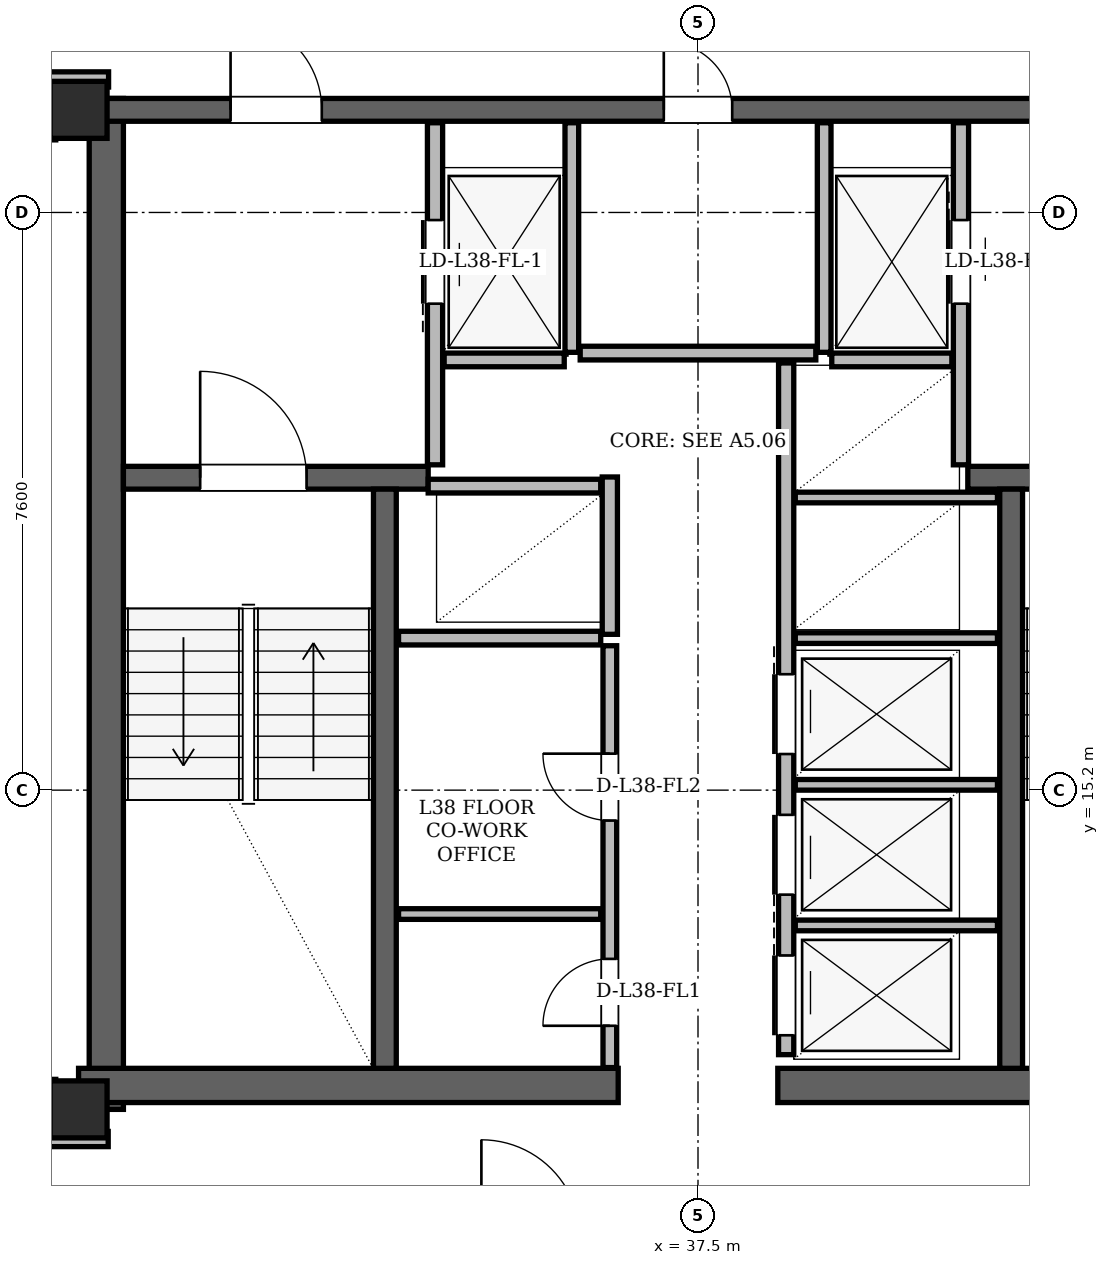
"""IFC4 building model, lengths in metres.
Left out: names, types, materials, properties, quantities, classifications, styles, units other than length and angle.
Written with IfcOpenShell. Run it as: python <this file> out.ifc"""

import sys

from ifc_helpers import new_model, si_unit, direction, frame, frame_2d, origin, origin_2d, place, context, subcontext, project, spatial, rectangle, hollow_rectangle, extrude, element, fill, save


model = new_model("IFC4")
c1 = context("Model", 3, precision=1e-05, world=origin(), true_north=direction((0.0, 1.0)))
c2 = subcontext(c1, "Body", "Model", "MODEL_VIEW")
j1 = project(units=[si_unit("LENGTHUNIT", "METRE"), si_unit("PLANEANGLEUNIT", "RADIAN")], contexts=[c1])
p1 = place(None, origin())
s1 = spatial("IfcSite", under=j1, at=p1, CompositionType="ELEMENT")
p2 = place(p1, origin())
s2 = spatial("IfcBuilding", under=s1, at=p2, CompositionType="ELEMENT")
p3 = place(p2, frame((0.0, 0.0, 145.8)))
s3 = spatial("IfcBuildingStorey", under=s2, at=p3, CompositionType="ELEMENT", Elevation=145.8)
for number, where, z_axis, x_axis in (
    (1, (29.35, 11.0, 0.0), (0.0, 0.0, 1.0), (1.0, 0.0, 0.0)),
    (2, (29.35, 24.15, 0.0), (0.0, 0.0, 1.0), (1.0, 0.0, 0.0)),
):
    element("IfcColumn", number, at=place(p3, frame(where, z_axis=z_axis, x_axis=x_axis)), inside=s3, PredefinedType="COLUMN", context=c2, shape_type="SweptSolid", body=[
        extrude(hollow_rectangle(XDim=0.75, YDim=0.75, WallThickness=0.06, at=origin_2d()), origin(), (0.0, 0.0, 1.0), 3.6),
    ])
p4 = place(p3, frame((29.715, 11.0, 0.0), z_axis=(0.0, 0.0, 1.0), x_axis=(0.0, 1.0, 0.0)))
e3 = element("IfcWall", 3, at=p4, inside=s3, PredefinedType="SHEAR", context=c2, shape_type="SweptSolid", body=[
    extrude(rectangle(XDim=13.3, YDim=0.45, at=frame_2d((6.65, 0.0))), origin(), (0.0, 0.0, 1.0), 3.38),
])
for number, where, z_axis, x_axis in (
    (4, (29.35, 11.315, 0.0), (0.0, 0.0, 1.0), (1.0, 0.0, 0.0)),
    (5, (38.55, 11.315, 0.0), (0.0, 0.0, 1.0), (1.0, 0.0, 0.0)),
):
    element("IfcWall", number, at=place(p3, frame(where, z_axis=z_axis, x_axis=x_axis)), inside=s3, PredefinedType="SHEAR", context=c2, shape_type="SweptSolid", body=[
        extrude(rectangle(XDim=7.1, YDim=0.45, at=frame_2d((3.55, 0.0))), origin(), (0.0, 0.0, 1.0), 3.38),
    ])
p5 = place(p3, frame((29.65, 24.15, 0.0), z_axis=(0.0, 0.0, 1.0), x_axis=(1.0, 0.0, 0.0)))
e6 = element("IfcWall", 6, at=p5, inside=s3, PredefinedType="SHEAR", context=c2, shape_type="SweptSolid", body=[
    extrude(rectangle(XDim=15.7, YDim=0.3, at=frame_2d((7.85, 0.0))), origin(), (0.0, 0.0, 1.0), 3.38),
])
p6 = place(p5, frame((1.7, 0.0, 0.0)))
e7 = element("IfcOpeningElement", 7, at=p6, cuts=e6, PredefinedType="OPENING", context=c2, shape_type="SweptSolid", body=[
    extrude(rectangle(XDim=1.2, YDim=2.2, at=frame_2d((0.6, 1.1))), frame((0.0, 0.15, 0.0), z_axis=(0.0, -1.0, 0.0), x_axis=(1.0, 0.0, 0.0)), (0.0, 0.0, 1.0), 0.3),
])
p7 = place(p5, frame((12.8, 0.0, 0.0)))
e8 = element("IfcOpeningElement", 8, at=p7, cuts=e6, PredefinedType="OPENING", context=c2, shape_type="SweptSolid", body=[
    extrude(rectangle(XDim=1.2, YDim=2.2, at=frame_2d((0.6, 1.1))), frame((0.0, 0.15, 0.0), z_axis=(0.0, -1.0, 0.0), x_axis=(1.0, 0.0, 0.0)), (0.0, 0.0, 1.0), 0.3),
])
p8 = place(p5, frame((7.4, 0.0, 0.0)))
e9 = element("IfcOpeningElement", 9, at=p8, cuts=e6, PredefinedType="OPENING", context=c2, shape_type="SweptSolid", body=[
    extrude(rectangle(XDim=0.9, YDim=2.05, at=frame_2d((0.45, 1.025))), frame((0.0, 0.15, 0.0), z_axis=(0.0, -1.0, 0.0), x_axis=(1.0, 0.0, 0.0)), (0.0, 0.0, 1.0), 0.3),
])
p9 = place(p3, frame((29.94, 19.31, 0.0), z_axis=(0.0, 0.0, 1.0), x_axis=(1.0, 0.0, 0.0)))
e10 = element("IfcWall", 10, at=p9, inside=s3, PredefinedType="SHEAR", context=c2, shape_type="SweptSolid", body=[
    extrude(rectangle(XDim=4.01, YDim=0.3, at=frame_2d((2.005, 0.0))), origin(), (0.0, 0.0, 1.0), 3.38),
])
p10 = place(p9, frame((1.01, 0.0, 0.0)))
e11 = element("IfcOpeningElement", 11, at=p10, cuts=e10, PredefinedType="OPENING", context=c2, shape_type="SweptSolid", body=[
    extrude(rectangle(XDim=1.4, YDim=2.2, at=frame_2d((0.7, 1.1))), frame((0.0, 0.15, 0.0), z_axis=(0.0, -1.0, 0.0), x_axis=(1.0, 0.0, 0.0)), (0.0, 0.0, 1.0), 0.3),
])
p11 = place(p3, frame((41.05, 19.31, 0.0), z_axis=(0.0, 0.0, 1.0), x_axis=(1.0, 0.0, 0.0)))
e12 = element("IfcWall", 12, at=p11, inside=s3, PredefinedType="SHEAR", context=c2, shape_type="SweptSolid", body=[
    extrude(rectangle(XDim=4.01, YDim=0.3, at=frame_2d((2.005, 0.0))), origin(), (0.0, 0.0, 1.0), 3.38),
])
p12 = place(p11, frame((1.6, 0.0, 0.0)))
e13 = element("IfcOpeningElement", 13, at=p12, cuts=e12, PredefinedType="OPENING", context=c2, shape_type="SweptSolid", body=[
    extrude(rectangle(XDim=1.4, YDim=2.2, at=frame_2d((0.7, 1.1))), frame((0.0, 0.15, 0.0), z_axis=(0.0, -1.0, 0.0), x_axis=(1.0, 0.0, 0.0)), (0.0, 0.0, 1.0), 0.3),
])
for number, where, z_axis, x_axis in (
    (14, (33.38, 11.54, 0.0), (0.0, 0.0, 1.0), (0.0, 1.0, 0.0)),
    (15, (41.62, 11.54, 0.0), (0.0, 0.0, 1.0), (0.0, 1.0, 0.0)),
):
    element("IfcWall", number, at=place(p3, frame(where, z_axis=z_axis, x_axis=x_axis)), inside=s3, PredefinedType="SHEAR", context=c2, shape_type="SweptSolid", body=[
        extrude(rectangle(XDim=7.62, YDim=0.3, at=frame_2d((3.81, 0.0))), origin(), (0.0, 0.0, 1.0), 3.38),
    ])
p13 = place(p3, frame((32.649, 43.341, 0.0), z_axis=(0.0, 0.0, 1.0), x_axis=(-0.500002412417, -0.86602401097, 0.0)))
e16 = element("IfcWall", 16, at=p13, inside=s3, PredefinedType="SOLIDWALL", context=c2, shape_type="SweptSolid", body=[
    extrude(rectangle(XDim=35.404, YDim=0.34, at=frame_2d((17.702, 0.0))), origin(), (0.0, 0.0, 1.0), 2.6),
])
p14 = place(p13, frame((6.579, 0.0, 0.0)))
e17 = element("IfcOpeningElement", 17, at=p14, cuts=e16, PredefinedType="OPENING", context=c2, shape_type="SweptSolid", body=[
    extrude(rectangle(XDim=1.5, YDim=2.2, at=frame_2d((0.75, 1.1))), frame((0.0, 0.17, 0.0), z_axis=(0.0, -1.0, 0.0), x_axis=(1.0, 0.0, 0.0)), (0.0, 0.0, 1.0), 0.34),
])
p15 = place(p13, frame((26.289, 0.0, 0.0)))
e18 = element("IfcOpeningElement", 18, at=p15, cuts=e16, PredefinedType="OPENING", context=c2, shape_type="SweptSolid", body=[
    extrude(rectangle(XDim=1.5, YDim=2.2, at=frame_2d((0.75, 1.1))), frame((0.0, 0.17, 0.0), z_axis=(0.0, -1.0, 0.0), x_axis=(1.0, 0.0, 0.0)), (0.0, 0.0, 1.0), 0.34),
])
p16 = place(p13, frame((22.194, 0.0, 0.85)))
e19 = element("IfcOpeningElement", 19, at=p16, cuts=e16, PredefinedType="OPENING", context=c2, shape_type="SweptSolid", body=[
    extrude(rectangle(XDim=1.2, YDim=1.48, at=frame_2d((0.6, 0.74))), frame((0.0, 0.17, 0.0), z_axis=(0.0, -1.0, 0.0), x_axis=(1.0, 0.0, 0.0)), (0.0, 0.0, 1.0), 0.34),
])
p17 = place(p13, frame((2.317, 0.0, 0.85)))
e20 = element("IfcOpeningElement", 20, at=p17, cuts=e16, PredefinedType="OPENING", context=c2, shape_type="SweptSolid", body=[
    extrude(rectangle(XDim=1.6, YDim=1.64, at=frame_2d((0.8, 0.82))), frame((0.0, 0.17, 0.0), z_axis=(0.0, -1.0, 0.0), x_axis=(1.0, 0.0, 0.0)), (0.0, 0.0, 1.0), 0.34),
])
p18 = place(p13, frame((12.951, 0.0, 0.85)))
e21 = element("IfcOpeningElement", 21, at=p18, cuts=e16, PredefinedType="OPENING", context=c2, shape_type="SweptSolid", body=[
    extrude(rectangle(XDim=3.0, YDim=1.64, at=frame_2d((1.5, 0.82))), frame((0.0, 0.17, 0.0), z_axis=(0.0, -1.0, 0.0), x_axis=(1.0, 0.0, 0.0)), (0.0, 0.0, 1.0), 0.34),
])
p19 = place(p13, frame((20.282, 0.0, 0.85)))
e22 = element("IfcOpeningElement", 22, at=p19, cuts=e16, PredefinedType="OPENING", context=c2, shape_type="SweptSolid", body=[
    extrude(rectangle(XDim=1.2, YDim=1.48, at=frame_2d((0.6, 0.74))), frame((0.0, 0.17, 0.0), z_axis=(0.0, -1.0, 0.0), x_axis=(1.0, 0.0, 0.0)), (0.0, 0.0, 1.0), 0.34),
])
p20 = place(p13, frame((33.524, 0.0, 0.85)))
e23 = element("IfcOpeningElement", 23, at=p20, cuts=e16, PredefinedType="OPENING", context=c2, shape_type="SweptSolid", body=[
    extrude(rectangle(XDim=1.2, YDim=1.48, at=frame_2d((0.6, 0.74))), frame((0.0, 0.17, 0.0), z_axis=(0.0, -1.0, 0.0), x_axis=(1.0, 0.0, 0.0)), (0.0, 0.0, 1.0), 0.34),
])
p21 = place(p3, frame((34.04, 19.48, 0.0), z_axis=(0.0, 0.0, 1.0), x_axis=(0.0, 1.0, 0.0)))
e24 = element("IfcWall", 24, at=p21, inside=s3, PredefinedType="PARTITIONING", context=c2, shape_type="SweptSolid", body=[
    extrude(rectangle(XDim=4.5, YDim=0.2, at=frame_2d((2.25, 0.0))), origin(), (0.0, 0.0, 1.0), 2.42),
])
p22 = place(p21, frame((2.12, 0.0, 0.0)))
e25 = element("IfcOpeningElement", 25, at=p22, cuts=e24, PredefinedType="OPENING", context=c2, shape_type="SweptSolid", body=[
    extrude(rectangle(XDim=1.1, YDim=2.2, at=frame_2d((0.55, 1.1))), frame((0.0, 0.1, 0.0), z_axis=(0.0, -1.0, 0.0), x_axis=(1.0, 0.0, 0.0)), (0.0, 0.0, 1.0), 0.2),
])
p23 = place(p3, frame((35.84, 20.96, 0.0), z_axis=(0.0, 0.0, 1.0), x_axis=(0.0, 1.0, 0.0)))
e26 = element("IfcWall", 26, at=p23, inside=s3, PredefinedType="PARTITIONING", context=c2, shape_type="SweptSolid", body=[
    extrude(rectangle(XDim=3.02, YDim=0.18, at=frame_2d((1.51, 0.0))), origin(), (0.0, 0.0, 1.0), 2.42),
])
p24 = place(p3, frame((34.16, 20.86, 0.0), z_axis=(0.0, 0.0, 1.0), x_axis=(1.0, 0.0, 0.0)))
e27 = element("IfcWall", 27, at=p24, inside=s3, PredefinedType="PARTITIONING", context=c2, shape_type="SweptSolid", body=[
    extrude(rectangle(XDim=1.58, YDim=0.18, at=frame_2d((0.79, 0.0))), origin(), (0.0, 0.0, 1.0), 3.38),
])
p25 = place(p3, frame((40.96, 19.48, 0.0), z_axis=(0.0, 0.0, 1.0), x_axis=(0.0, 1.0, 0.0)))
e28 = element("IfcWall", 28, at=p25, inside=s3, PredefinedType="PARTITIONING", context=c2, shape_type="SweptSolid", body=[
    extrude(rectangle(XDim=4.5, YDim=0.2, at=frame_2d((2.25, 0.0))), origin(), (0.0, 0.0, 1.0), 2.42),
])
p26 = place(p25, frame((2.12, 0.0, 0.0)))
e29 = element("IfcOpeningElement", 29, at=p26, cuts=e28, PredefinedType="OPENING", context=c2, shape_type="SweptSolid", body=[
    extrude(rectangle(XDim=1.1, YDim=2.2, at=frame_2d((0.55, 1.1))), frame((0.0, 0.1, 0.0), z_axis=(0.0, -1.0, 0.0), x_axis=(1.0, 0.0, 0.0)), (0.0, 0.0, 1.0), 0.2),
])
p27 = place(p3, frame((39.16, 20.96, 0.0), z_axis=(0.0, 0.0, 1.0), x_axis=(0.0, 1.0, 0.0)))
e30 = element("IfcWall", 30, at=p27, inside=s3, PredefinedType="PARTITIONING", context=c2, shape_type="SweptSolid", body=[
    extrude(rectangle(XDim=3.02, YDim=0.18, at=frame_2d((1.51, 0.0))), origin(), (0.0, 0.0, 1.0), 2.42),
])
p28 = place(p3, frame((39.26, 20.86, 0.0), z_axis=(0.0, 0.0, 1.0), x_axis=(1.0, 0.0, 0.0)))
e31 = element("IfcWall", 31, at=p28, inside=s3, PredefinedType="PARTITIONING", context=c2, shape_type="SweptSolid", body=[
    extrude(rectangle(XDim=1.58, YDim=0.18, at=frame_2d((0.79, 0.0))), origin(), (0.0, 0.0, 1.0), 3.38),
])
p29 = place(p3, frame((36.34, 17.25, 0.0), z_axis=(0.0, 0.0, 1.0), x_axis=(0.0, 1.0, 0.0)))
e32 = element("IfcWall", 32, at=p29, inside=s3, PredefinedType="PARTITIONING", context=c2, shape_type="SweptSolid", body=[
    extrude(rectangle(XDim=2.07, YDim=0.2, at=frame_2d((1.035, 0.0))), origin(), (0.0, 0.0, 1.0), 3.38),
])
p30 = place(p3, frame((33.95, 19.2, 0.0), z_axis=(0.0, 0.0, 1.0), x_axis=(1.0, 0.0, 0.0)))
e33 = element("IfcWall", 33, at=p30, inside=s3, PredefinedType="PARTITIONING", context=c2, shape_type="SweptSolid", body=[
    extrude(rectangle(XDim=2.27, YDim=0.18, at=frame_2d((1.135, 0.0))), origin(), (0.0, 0.0, 1.0), 3.38),
])
p31 = place(p3, frame((33.56, 17.2, 0.0), z_axis=(0.0, 0.0, 1.0), x_axis=(1.0, 0.0, 0.0)))
e34 = element("IfcWall", 34, at=p31, inside=s3, PredefinedType="PARTITIONING", context=c2, shape_type="SweptSolid", body=[
    extrude(rectangle(XDim=2.66, YDim=0.18, at=frame_2d((1.33, 0.0))), origin(), (0.0, 0.0, 1.0), 3.38),
])
p32 = place(p3, frame((36.34, 11.55, 0.0), z_axis=(0.0, 0.0, 1.0), x_axis=(0.0, 1.0, 0.0)))
e35 = element("IfcWall", 35, at=p32, inside=s3, PredefinedType="PARTITIONING", context=c2, shape_type="SweptSolid", body=[
    extrude(rectangle(XDim=5.55, YDim=0.18, at=frame_2d((2.775, 0.0))), origin(), (0.0, 0.0, 1.0), 3.38),
])
p33 = place(p32, frame((0.55, 0.0, 0.0)))
e36 = element("IfcOpeningElement", 36, at=p33, cuts=e35, PredefinedType="OPENING", context=c2, shape_type="SweptSolid", body=[
    extrude(rectangle(XDim=0.88, YDim=2.08, at=frame_2d((0.44, 1.04))), frame((0.0, 0.09, 0.0), z_axis=(0.0, -1.0, 0.0), x_axis=(1.0, 0.0, 0.0)), (0.0, 0.0, 1.0), 0.18),
])
p34 = place(p32, frame((3.25, 0.0, 0.0)))
e37 = element("IfcOpeningElement", 37, at=p34, cuts=e35, PredefinedType="OPENING", context=c2, shape_type="SweptSolid", body=[
    extrude(rectangle(XDim=0.88, YDim=2.08, at=frame_2d((0.44, 1.04))), frame((0.0, 0.09, 0.0), z_axis=(0.0, -1.0, 0.0), x_axis=(1.0, 0.0, 0.0)), (0.0, 0.0, 1.0), 0.18),
])
p35 = place(p3, frame((33.56, 13.57, 0.0), z_axis=(0.0, 0.0, 1.0), x_axis=(1.0, 0.0, 0.0)))
e38 = element("IfcWall", 38, at=p35, inside=s3, PredefinedType="PARTITIONING", context=c2, shape_type="SweptSolid", body=[
    extrude(rectangle(XDim=2.66, YDim=0.14, at=frame_2d((1.33, 0.0))), origin(), (0.0, 0.0, 1.0), 3.38),
])
p36 = place(p3, frame((38.66, 11.72, 0.0), z_axis=(0.0, 0.0, 1.0), x_axis=(0.0, 1.0, 0.0)))
e39 = element("IfcWall", 39, at=p36, inside=s3, PredefinedType="PARTITIONING", context=c2, shape_type="SweptSolid", body=[
    extrude(rectangle(XDim=9.1, YDim=0.2, at=frame_2d((4.55, 0.0))), origin(), (0.0, 0.0, 1.0), 3.38),
])
p37 = place(p36, frame((0.255, 0.0, 0.0)))
e40 = element("IfcOpeningElement", 40, at=p37, cuts=e39, PredefinedType="OPENING", context=c2, shape_type="SweptSolid", body=[
    extrude(rectangle(XDim=1.05, YDim=2.15, at=frame_2d((0.525, 1.075))), frame((0.0, 0.1, 0.0), z_axis=(0.0, -1.0, 0.0), x_axis=(1.0, 0.0, 0.0)), (0.0, 0.0, 1.0), 0.2),
])
p38 = place(p36, frame((2.105, 0.0, 0.0)))
e41 = element("IfcOpeningElement", 41, at=p38, cuts=e39, PredefinedType="OPENING", context=c2, shape_type="SweptSolid", body=[
    extrude(rectangle(XDim=1.05, YDim=2.15, at=frame_2d((0.525, 1.075))), frame((0.0, 0.1, 0.0), z_axis=(0.0, -1.0, 0.0), x_axis=(1.0, 0.0, 0.0)), (0.0, 0.0, 1.0), 0.2),
])
p39 = place(p36, frame((3.955, 0.0, 0.0)))
e42 = element("IfcOpeningElement", 42, at=p39, cuts=e39, PredefinedType="OPENING", context=c2, shape_type="SweptSolid", body=[
    extrude(rectangle(XDim=1.05, YDim=2.15, at=frame_2d((0.525, 1.075))), frame((0.0, 0.1, 0.0), z_axis=(0.0, -1.0, 0.0), x_axis=(1.0, 0.0, 0.0)), (0.0, 0.0, 1.0), 0.2),
])
for number, where, z_axis, x_axis in (
    (43, (38.78, 13.42, 0.0), (0.0, 0.0, 1.0), (1.0, 0.0, 0.0)),
    (44, (38.78, 15.27, 0.0), (0.0, 0.0, 1.0), (1.0, 0.0, 0.0)),
    (45, (38.78, 17.2, 0.0), (0.0, 0.0, 1.0), (1.0, 0.0, 0.0)),
    (46, (38.78, 19.05, 0.0), (0.0, 0.0, 1.0), (1.0, 0.0, 0.0)),
):
    element("IfcWall", number, at=place(p3, frame(where, z_axis=z_axis, x_axis=x_axis)), inside=s3, PredefinedType="PARTITIONING", context=c2, shape_type="SweptSolid", body=[
        extrude(rectangle(XDim=2.66, YDim=0.14, at=frame_2d((1.33, 0.0))), origin(), (0.0, 0.0, 1.0), 3.38),
    ])
p40 = place(p3, frame((35.95, 20.95, 0.0), z_axis=(0.0, 0.0, 1.0), x_axis=(1.0, 0.0, 0.0)))
e47 = element("IfcWall", 47, at=p40, inside=s3, PredefinedType="PARTITIONING", context=c2, shape_type="SweptSolid", body=[
    extrude(rectangle(XDim=3.1, YDim=0.18, at=frame_2d((1.55, 0.0))), origin(), (0.0, 0.0, 1.0), 3.38),
])
p41 = place(p3, frame((28.96, 10.61, 0.0), z_axis=(0.0, 0.0, 1.0), x_axis=(1.0, 0.0, 0.0)))
e48 = element("IfcWall", 48, at=p41, inside=s3, PredefinedType="PARTITIONING", context=c2, shape_type="SweptSolid", body=[
    extrude(rectangle(XDim=0.78, YDim=0.2, at=frame_2d((0.39, 0.0))), origin(), (0.0, 0.0, 1.0), 2.42),
])
p42 = place(p3, frame((28.955, 24.55, 0.0), z_axis=(0.0, 0.0, 1.0), x_axis=(1.0, 0.0, 0.0)))
e49 = element("IfcWall", 49, at=p42, inside=s3, PredefinedType="PARTITIONING", context=c2, shape_type="SweptSolid", body=[
    extrude(rectangle(XDim=0.79, YDim=0.2, at=frame_2d((0.395, 0.0))), origin(), (0.0, 0.0, 1.0), 2.842),
])
p43 = place(p3, frame((28.95, 10.95, 0.0), z_axis=(0.0, 0.0, 1.0), x_axis=(0.0, 1.0, 0.0)))
e50 = element("IfcWall", 50, at=p43, inside=s3, PredefinedType="PARTITIONING", context=c2, shape_type="SweptSolid", body=[
    extrude(rectangle(XDim=0.445, YDim=0.2, at=frame_2d((0.223, 0.0))), origin(), (0.0, 0.0, 1.0), 2.842),
])
p44 = place(p3, frame((28.95, 23.755, 0.0), z_axis=(0.0, 0.0, 1.0), x_axis=(0.0, 1.0, 0.0)))
e51 = element("IfcWall", 51, at=p44, inside=s3, PredefinedType="PARTITIONING", context=c2, shape_type="SweptSolid", body=[
    extrude(rectangle(XDim=0.565, YDim=0.2, at=frame_2d((0.283, 0.0))), origin(), (0.0, 0.0, 1.0), 3.38),
])
p45 = place(p33, origin())
e52 = element("IfcDoor", 52, at=p45, inside=s3, OperationType="SINGLE_SWING_LEFT", PredefinedType="DOOR", context=c2, shape_type="SweptSolid", body=[
    extrude(rectangle(XDim=0.88, YDim=2.08, at=frame_2d((0.44, 1.04))), frame((0.0, 0.025, 0.0), z_axis=(0.0, -1.0, 0.0), x_axis=(1.0, 0.0, 0.0)), (0.0, 0.0, 1.0), 0.05),
])
fill(e36, e52)
p46 = place(p34, origin())
e53 = element("IfcDoor", 53, at=p46, inside=s3, OperationType="SINGLE_SWING_RIGHT", PredefinedType="DOOR", context=c2, shape_type="SweptSolid", body=[
    extrude(rectangle(XDim=0.88, YDim=2.08, at=frame_2d((0.44, 1.04))), frame((0.0, 0.025, 0.0), z_axis=(0.0, -1.0, 0.0), x_axis=(1.0, 0.0, 0.0)), (0.0, 0.0, 1.0), 0.05),
])
fill(e37, e53)
p47 = place(p22, origin())
e54 = element("IfcDoor", 54, at=p47, inside=s3, OperationType="SLIDING_TO_LEFT", PredefinedType="DOOR", context=c2, shape_type="SweptSolid", body=[
    extrude(rectangle(XDim=1.1, YDim=2.2, at=frame_2d((0.55, 1.1))), frame((0.0, 0.025, 0.0), z_axis=(0.0, -1.0, 0.0), x_axis=(1.0, 0.0, 0.0)), (0.0, 0.0, 1.0), 0.05),
])
fill(e25, e54)
p48 = place(p26, origin())
e55 = element("IfcDoor", 55, at=p48, inside=s3, OperationType="SLIDING_TO_RIGHT", PredefinedType="DOOR", context=c2, shape_type="SweptSolid", body=[
    extrude(rectangle(XDim=1.1, YDim=2.2, at=frame_2d((0.55, 1.1))), frame((0.0, 0.025, 0.0), z_axis=(0.0, -1.0, 0.0), x_axis=(1.0, 0.0, 0.0)), (0.0, 0.0, 1.0), 0.05),
])
fill(e29, e55)
p49 = place(p37, origin())
e56 = element("IfcDoor", 56, at=p49, inside=s3, OperationType="SLIDING_TO_RIGHT", PredefinedType="DOOR", context=c2, shape_type="SweptSolid", body=[
    extrude(rectangle(XDim=1.05, YDim=2.15, at=frame_2d((0.525, 1.075))), frame((0.0, 0.025, 0.0), z_axis=(0.0, -1.0, 0.0), x_axis=(1.0, 0.0, 0.0)), (0.0, 0.0, 1.0), 0.05),
])
fill(e40, e56)
p50 = place(p38, origin())
e57 = element("IfcDoor", 57, at=p50, inside=s3, OperationType="SLIDING_TO_LEFT", PredefinedType="DOOR", context=c2, shape_type="SweptSolid", body=[
    extrude(rectangle(XDim=1.05, YDim=2.15, at=frame_2d((0.525, 1.075))), frame((0.0, 0.025, 0.0), z_axis=(0.0, -1.0, 0.0), x_axis=(1.0, 0.0, 0.0)), (0.0, 0.0, 1.0), 0.05),
])
fill(e41, e57)
p51 = place(p39, origin())
e58 = element("IfcDoor", 58, at=p51, inside=s3, OperationType="SLIDING_TO_RIGHT", PredefinedType="DOOR", context=c2, shape_type="SweptSolid", body=[
    extrude(rectangle(XDim=1.05, YDim=2.15, at=frame_2d((0.525, 1.075))), frame((0.0, 0.025, 0.0), z_axis=(0.0, -1.0, 0.0), x_axis=(1.0, 0.0, 0.0)), (0.0, 0.0, 1.0), 0.05),
])
fill(e42, e58)
p52 = place(p10, origin())
e59 = element("IfcDoor", 59, at=p52, inside=s3, OperationType="SINGLE_SWING_LEFT", PredefinedType="DOOR", context=c2, shape_type="SweptSolid", body=[
    extrude(rectangle(XDim=1.4, YDim=2.2, at=frame_2d((0.7, 1.1))), frame((0.0, 0.025, 0.0), z_axis=(0.0, -1.0, 0.0), x_axis=(1.0, 0.0, 0.0)), (0.0, 0.0, 1.0), 0.05),
])
fill(e11, e59)
p53 = place(p6, origin())
e60 = element("IfcDoor", 60, at=p53, inside=s3, OperationType="SINGLE_SWING_LEFT", PredefinedType="DOOR", context=c2, shape_type="SweptSolid", body=[
    extrude(rectangle(XDim=1.2, YDim=2.2, at=frame_2d((0.6, 1.1))), frame((0.0, 0.025, 0.0), z_axis=(0.0, -1.0, 0.0), x_axis=(1.0, 0.0, 0.0)), (0.0, 0.0, 1.0), 0.05),
])
fill(e7, e60)
p54 = place(p8, origin())
e61 = element("IfcDoor", 61, at=p54, inside=s3, OperationType="SINGLE_SWING_LEFT", PredefinedType="DOOR", context=c2, shape_type="SweptSolid", body=[
    extrude(rectangle(XDim=0.9, YDim=2.05, at=frame_2d((0.45, 1.025))), frame((0.0, 0.025, 0.0), z_axis=(0.0, -1.0, 0.0), x_axis=(1.0, 0.0, 0.0)), (0.0, 0.0, 1.0), 0.05),
])
fill(e9, e61)
save(model, sys.argv[1])
